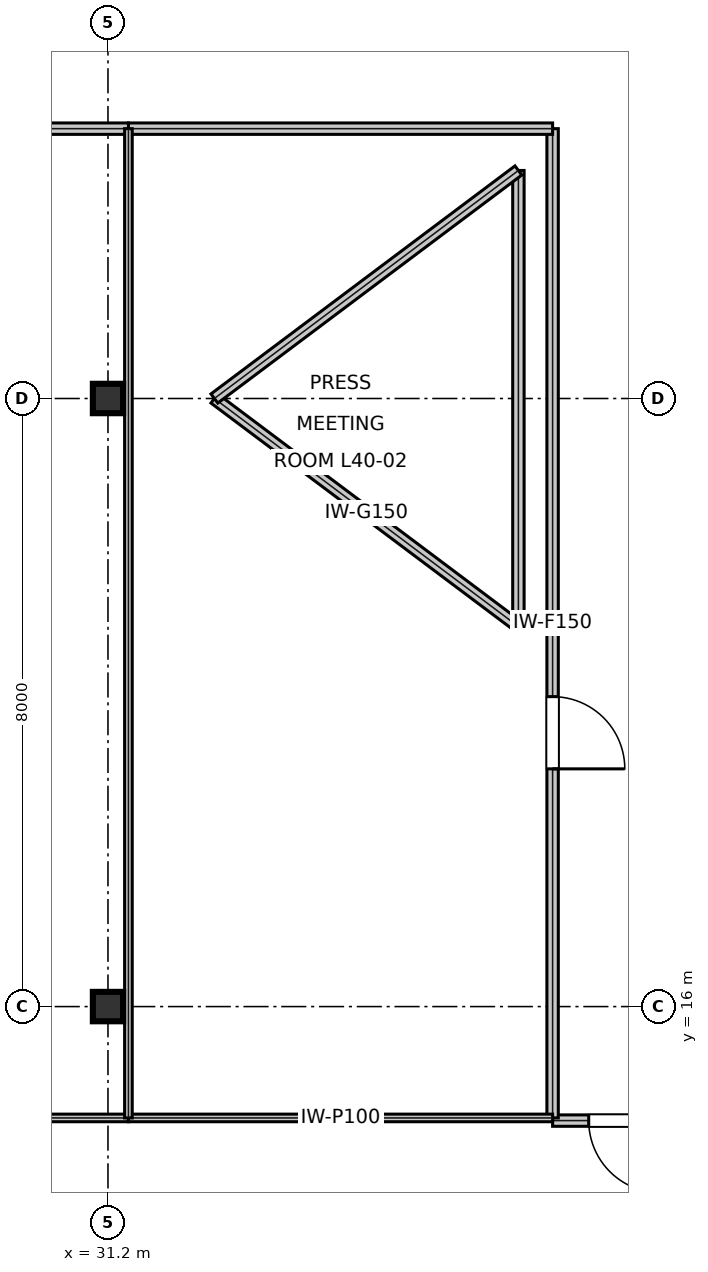
"""IFC4 building model, lengths in metres.
Left out: names, types, materials, properties, quantities, classifications, styles, units other than length and angle.
Written with IfcOpenShell. Run it as: python <this file> out.ifc"""

import sys

from ifc_helpers import new_model, si_unit, direction, frame, frame_2d, origin, origin_2d, place, context, subcontext, project, spatial, rectangle, i_section, extrude, element, fill, save


model = new_model("IFC4")
c1 = context("Model", 3, precision=1e-05, world=origin(), true_north=direction((0.0, 1.0)))
c2 = subcontext(c1, "Body", "Model", "MODEL_VIEW")
j1 = project(units=[si_unit("LENGTHUNIT", "METRE"), si_unit("PLANEANGLEUNIT", "RADIAN")], contexts=[c1])
p1 = place(None, origin())
s1 = spatial("IfcSite", under=j1, at=p1, CompositionType="ELEMENT")
p2 = place(p1, origin())
s2 = spatial("IfcBuilding", under=s1, at=p2, CompositionType="ELEMENT")
p3 = place(p2, frame((0.0, 0.0, 173.55)))
s3 = spatial("IfcBuildingStorey", under=s2, at=p3, CompositionType="ELEMENT", Elevation=173.55)
for number, where, z_axis, x_axis in (
    (1, (31.2, 16.0, 0.0), (0.0, 0.0, 1.0), (1.0, 0.0, 0.0)),
    (2, (31.2, 24.0, 0.0), (0.0, 0.0, 1.0), (1.0, 0.0, 0.0)),
):
    element("IfcColumn", number, at=place(p3, frame(where, z_axis=z_axis, x_axis=x_axis)), inside=s3, PredefinedType="COLUMN", context=c2, shape_type="SweptSolid", body=[
        extrude(i_section(OverallWidth=0.398, OverallDepth=0.387, WebThickness=0.021, FlangeThickness=0.033, at=origin_2d()), origin(), (0.0, 0.0, 1.0), 4.044),
    ])
p4 = place(p3, frame((37.05, 14.5, 0.0), z_axis=(0.0, 0.0, 1.0), x_axis=(1.0, 0.0, 0.0)))
e3 = element("IfcWall", 3, at=p4, inside=s3, PredefinedType="PARTITIONING", context=c2, shape_type="SweptSolid", body=[
    extrude(rectangle(XDim=1.9, YDim=0.15, at=frame_2d((0.95, 0.0))), origin(), (0.0, 0.0, 1.0), 3.19),
])
p5 = place(p4, frame((0.475, 0.0, 0.0)))
e4 = element("IfcOpeningElement", 4, at=p5, cuts=e3, PredefinedType="OPENING", context=c2, shape_type="SweptSolid", body=[
    extrude(rectangle(XDim=0.95, YDim=2.15, at=frame_2d((0.475, 1.075))), frame((0.0, 0.085, 0.0), z_axis=(0.0, -1.0, 0.0), x_axis=(1.0, 0.0, 0.0)), (0.0, 0.0, 1.0), 0.17),
])
p6 = place(p3, frame((37.05, 14.535, 0.0), z_axis=(0.0, 0.0, 1.0), x_axis=(0.0, 1.0, 0.0)))
e5 = element("IfcWall", 5, at=p6, inside=s3, PredefinedType="PARTITIONING", context=c2, shape_type="SweptSolid", body=[
    extrude(rectangle(XDim=13.015, YDim=0.15, at=frame_2d((6.508, 0.0))), origin(), (0.0, 0.0, 1.0), 3.19),
])
p7 = place(p6, frame((4.593, 0.0, 0.0)))
e6 = element("IfcOpeningElement", 6, at=p7, cuts=e5, PredefinedType="OPENING", context=c2, shape_type="SweptSolid", body=[
    extrude(rectangle(XDim=0.95, YDim=2.15, at=frame_2d((0.475, 1.075))), frame((0.0, 0.085, 0.0), z_axis=(0.0, -1.0, 0.0), x_axis=(1.0, 0.0, 0.0)), (0.0, 0.0, 1.0), 0.17),
])
p8 = place(p3, frame((31.469, 27.55, 0.0), z_axis=(0.0, 0.0, 1.0), x_axis=(1.0, 0.0, 0.0)))
e7 = element("IfcWall", 7, at=p8, inside=s3, PredefinedType="PARTITIONING", context=c2, shape_type="SweptSolid", body=[
    extrude(rectangle(XDim=5.581, YDim=0.15, at=frame_2d((2.791, 0.0))), origin(), (0.0, 0.0, 1.0), 3.443),
])
p9 = place(p3, frame((29.4, 27.55, 0.0), z_axis=(0.0, 0.0, 1.0), x_axis=(1.0, 0.0, 0.0)))
e8 = element("IfcWall", 8, at=p9, inside=s3, PredefinedType="PARTITIONING", context=c2, shape_type="SweptSolid", body=[
    extrude(rectangle(XDim=2.069, YDim=0.15, at=frame_2d((1.035, 0.0))), origin(), (0.0, 0.0, 1.0), 3.19),
])
p10 = place(p3, frame((31.469, 14.535, 0.0), z_axis=(0.0, 0.0, 1.0), x_axis=(1.0, 0.0, 0.0)))
e9 = element("IfcWall", 9, at=p10, inside=s3, PredefinedType="PARTITIONING", context=c2, shape_type="SweptSolid", body=[
    extrude(rectangle(XDim=5.581, YDim=0.1, at=frame_2d((2.791, 0.0))), origin(), (0.0, 0.0, 1.0), 3.81),
])
p11 = place(p3, frame((29.205, 14.535, 0.0), z_axis=(0.0, 0.0, 1.0), x_axis=(1.0, 0.0, 0.0)))
e10 = element("IfcWall", 10, at=p11, inside=s3, PredefinedType="PARTITIONING", context=c2, shape_type="SweptSolid", body=[
    extrude(rectangle(XDim=2.264, YDim=0.1, at=frame_2d((1.132, 0.0))), origin(), (0.0, 0.0, 1.0), 3.81),
])
p12 = place(p3, frame((31.469, 14.535, 0.0), z_axis=(0.0, 0.0, 1.0), x_axis=(0.0, 1.0, 0.0)))
e11 = element("IfcWall", 11, at=p12, inside=s3, PredefinedType="PARTITIONING", context=c2, shape_type="SweptSolid", body=[
    extrude(rectangle(XDim=13.015, YDim=0.1, at=frame_2d((6.508, 0.0))), origin(), (0.0, 0.0, 1.0), 3.19),
])
p13 = place(p3, frame((32.6, 24.0, 0.0), z_axis=(0.0, 0.0, 1.0), x_axis=(0.8, -0.6, 0.0)))
e12 = element("IfcWall", 12, at=p13, inside=s3, PredefinedType="MOVABLE", context=c2, shape_type="SweptSolid", body=[
    extrude(rectangle(XDim=5.0, YDim=0.15, at=frame_2d((2.5, 0.0))), origin(), (0.0, 0.0, 1.0), 3.81),
])
p14 = place(p3, frame((36.6, 21.0, 0.0), z_axis=(0.0, 0.0, 1.0), x_axis=(0.0, 1.0, 0.0)))
e13 = element("IfcWall", 13, at=p14, inside=s3, PredefinedType="MOVABLE", context=c2, shape_type="SweptSolid", body=[
    extrude(rectangle(XDim=6.0, YDim=0.15, at=frame_2d((3.0, 0.0))), origin(), (0.0, 0.0, 1.0), 3.81),
])
p15 = place(p3, frame((36.6, 27.0, 0.0), z_axis=(0.0, 0.0, 1.0), x_axis=(-0.8, -0.6, 0.0)))
e14 = element("IfcWall", 14, at=p15, inside=s3, PredefinedType="MOVABLE", context=c2, shape_type="SweptSolid", body=[
    extrude(rectangle(XDim=5.0, YDim=0.15, at=frame_2d((2.5, 0.0))), origin(), (0.0, 0.0, 1.0), 3.81),
])
p16 = place(p5, frame((0.95, 0.0, 0.0), z_axis=(0.0, 0.0, 1.0), x_axis=(-1.0, 0.0, 0.0)))
e15 = element("IfcDoor", 15, at=p16, inside=s3, OperationType="SINGLE_SWING_LEFT", PredefinedType="DOOR", context=c2, shape_type="SweptSolid", body=[
    extrude(rectangle(XDim=0.95, YDim=2.15, at=frame_2d((0.475, 1.075))), frame((0.0, 0.025, 0.0), z_axis=(0.0, -1.0, 0.0), x_axis=(1.0, 0.0, 0.0)), (0.0, 0.0, 1.0), 0.05),
])
fill(e4, e15)
p17 = place(p7, frame((0.95, 0.0, 0.0), z_axis=(0.0, 0.0, 1.0), x_axis=(-1.0, 0.0, 0.0)))
e16 = element("IfcDoor", 16, at=p17, inside=s3, OperationType="SINGLE_SWING_RIGHT", PredefinedType="DOOR", context=c2, shape_type="SweptSolid", body=[
    extrude(rectangle(XDim=0.95, YDim=2.15, at=frame_2d((0.475, 1.075))), frame((0.0, 0.025, 0.0), z_axis=(0.0, -1.0, 0.0), x_axis=(1.0, 0.0, 0.0)), (0.0, 0.0, 1.0), 0.05),
])
fill(e6, e16)
save(model, sys.argv[1])
